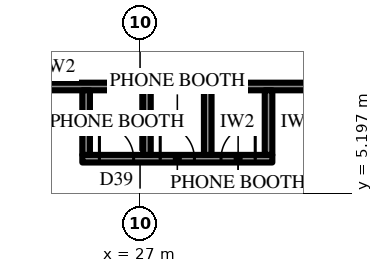
"""IFC4 building model, lengths in metres.
Left out: names, types, materials, properties, quantities, classifications, styles, units other than length and angle.
Written with IfcOpenShell. Run it as: python <this file> out.ifc"""

import sys

from ifc_helpers import new_model, si_unit, direction, frame, frame_2d, origin, place, context, subcontext, project, spatial, rectangle, extrude, element, fill, save


model = new_model("IFC4")
c1 = context("Model", 3, precision=1e-05, world=origin(), true_north=direction((0.0, 1.0)))
c2 = subcontext(c1, "Body", "Model", "MODEL_VIEW")
j1 = project(units=[si_unit("LENGTHUNIT", "METRE"), si_unit("PLANEANGLEUNIT", "RADIAN")], contexts=[c1])
p1 = place(None, origin())
s1 = spatial("IfcSite", under=j1, at=p1, CompositionType="ELEMENT")
p2 = place(p1, origin())
s2 = spatial("IfcBuilding", under=s1, at=p2, CompositionType="ELEMENT")
p3 = place(p2, frame((0.0, 0.0, 94.9)))
s3 = spatial("IfcBuildingStorey", under=s2, at=p3, CompositionType="ELEMENT", Elevation=94.9)
p4 = place(p3, frame((21.1, 8.0, 0.0), z_axis=(0.0, 0.0, 1.0), x_axis=(1.0, 0.0, 0.0)))
e1 = element("IfcWall", 1, at=p4, inside=s3, PredefinedType="PARTITIONING", context=c2, shape_type="SweptSolid", body=[
    extrude(rectangle(XDim=12.511, YDim=0.2, at=frame_2d((6.255, 0.0))), origin(), (0.0, 0.0, 1.0), 4.0),
])
p5 = place(p4, frame((0.751, 0.0, 0.0)))
e2 = element("IfcOpeningElement", 2, at=p5, cuts=e1, PredefinedType="OPENING", context=c2, shape_type="SweptSolid", body=[
    extrude(rectangle(XDim=1.0, YDim=2.2, at=frame_2d((0.5, 1.1))), frame((0.0, 0.11, 0.0), z_axis=(0.0, -1.0, 0.0), x_axis=(1.0, 0.0, 0.0)), (0.0, 0.0, 1.0), 0.22),
])
p6 = place(p3, frame((25.481, 6.1, 0.0), z_axis=(0.0, 0.0, 1.0), x_axis=(1.0, 0.0, 0.0)))
e3 = element("IfcWall", 3, at=p6, inside=s3, PredefinedType="PARTITIONING", context=c2, shape_type="SweptSolid", body=[
    extrude(rectangle(XDim=5.0, YDim=0.2, at=frame_2d((2.5, 0.0))), origin(), (0.0, 0.0, 1.0), 4.0),
])
p7 = place(p6, frame((0.45, 0.0, 0.0)))
e4 = element("IfcOpeningElement", 4, at=p7, cuts=e3, PredefinedType="OPENING", context=c2, shape_type="SweptSolid", body=[
    extrude(rectangle(XDim=0.9, YDim=2.2, at=frame_2d((0.45, 1.1))), frame((0.0, 0.11, 0.0), z_axis=(0.0, -1.0, 0.0), x_axis=(1.0, 0.0, 0.0)), (0.0, 0.0, 1.0), 0.22),
])
p8 = place(p6, frame((2.05, 0.0, 0.0)))
e5 = element("IfcOpeningElement", 5, at=p8, cuts=e3, PredefinedType="OPENING", context=c2, shape_type="SweptSolid", body=[
    extrude(rectangle(XDim=0.9, YDim=2.2, at=frame_2d((0.45, 1.1))), frame((0.0, 0.11, 0.0), z_axis=(0.0, -1.0, 0.0), x_axis=(1.0, 0.0, 0.0)), (0.0, 0.0, 1.0), 0.22),
])
p9 = place(p6, frame((3.65, 0.0, 0.0)))
e6 = element("IfcOpeningElement", 6, at=p9, cuts=e3, PredefinedType="OPENING", context=c2, shape_type="SweptSolid", body=[
    extrude(rectangle(XDim=0.9, YDim=2.2, at=frame_2d((0.45, 1.1))), frame((0.0, 0.11, 0.0), z_axis=(0.0, -1.0, 0.0), x_axis=(1.0, 0.0, 0.0)), (0.0, 0.0, 1.0), 0.22),
])
for number, where, z_axis, x_axis in (
    (7, (25.581, 7.9, 0.0), (0.0, 0.0, 1.0), (0.0, -1.0, 0.0)),
    (8, (27.181, 7.9, 0.0), (0.0, 0.0, 1.0), (0.0, -1.0, 0.0)),
    (9, (28.781, 7.9, 0.0), (0.0, 0.0, 1.0), (0.0, -1.0, 0.0)),
    (10, (30.381, 7.9, 0.0), (0.0, 0.0, 1.0), (0.0, -1.0, 0.0)),
):
    element("IfcWall", number, at=place(p3, frame(where, z_axis=z_axis, x_axis=x_axis)), inside=s3, PredefinedType="PARTITIONING", context=c2, shape_type="SweptSolid", body=[
        extrude(rectangle(XDim=1.7, YDim=0.2, at=frame_2d((0.85, 0.0))), origin(), (0.0, 0.0, 1.0), 4.0),
    ])
p10 = place(p7, origin())
e11 = element("IfcDoor", 11, at=p10, inside=s3, OperationType="SINGLE_SWING_RIGHT", PredefinedType="DOOR", context=c2, shape_type="SweptSolid", body=[
    extrude(rectangle(XDim=0.9, YDim=2.2, at=frame_2d((0.45, 1.1))), frame((0.0, 0.025, 0.0), z_axis=(0.0, -1.0, 0.0), x_axis=(1.0, 0.0, 0.0)), (0.0, 0.0, 1.0), 0.05),
])
fill(e4, e11)
p11 = place(p8, origin())
e12 = element("IfcDoor", 12, at=p11, inside=s3, OperationType="SINGLE_SWING_RIGHT", PredefinedType="DOOR", context=c2, shape_type="SweptSolid", body=[
    extrude(rectangle(XDim=0.9, YDim=2.2, at=frame_2d((0.45, 1.1))), frame((0.0, 0.025, 0.0), z_axis=(0.0, -1.0, 0.0), x_axis=(1.0, 0.0, 0.0)), (0.0, 0.0, 1.0), 0.05),
])
fill(e5, e12)
p12 = place(p9, origin())
e13 = element("IfcDoor", 13, at=p12, inside=s3, OperationType="SINGLE_SWING_LEFT", PredefinedType="DOOR", context=c2, shape_type="SweptSolid", body=[
    extrude(rectangle(XDim=0.9, YDim=2.2, at=frame_2d((0.45, 1.1))), frame((0.0, 0.025, 0.0), z_axis=(0.0, -1.0, 0.0), x_axis=(1.0, 0.0, 0.0)), (0.0, 0.0, 1.0), 0.05),
])
fill(e6, e13)
save(model, sys.argv[1])
